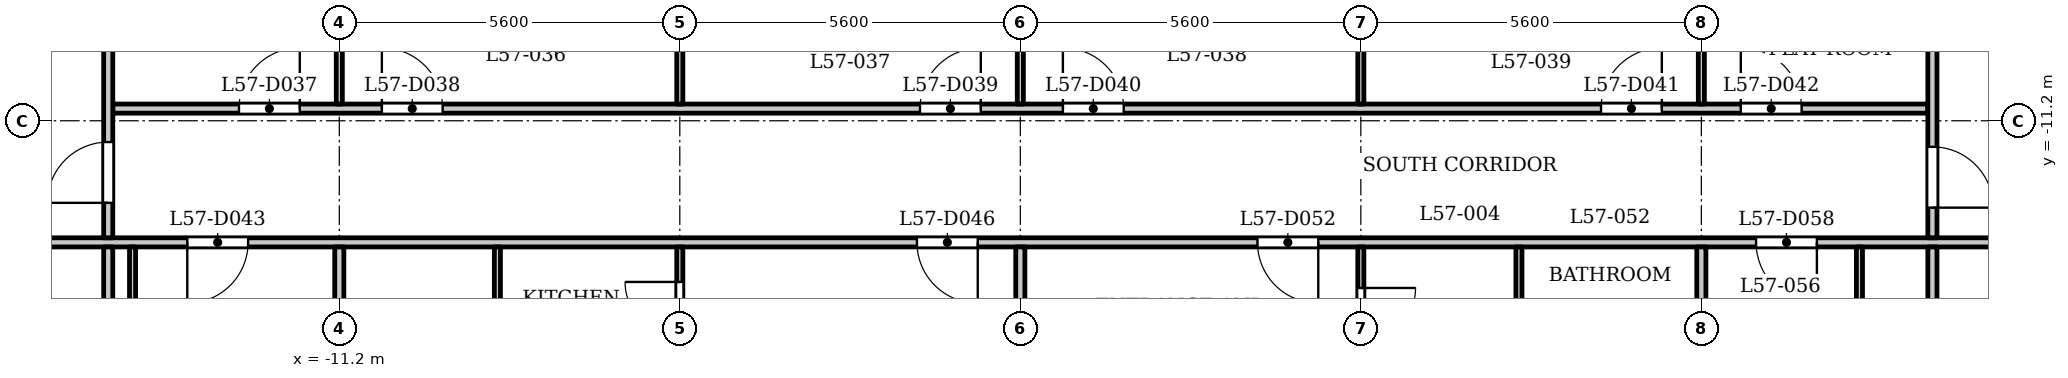
"""IFC4 building model, lengths in metres.
Left out: names, types, materials, properties, quantities, classifications, styles, units other than length and angle.
Written with IfcOpenShell. Run it as: python <this file> out.ifc"""

import sys

from ifc_helpers import new_model, si_unit, direction, frame, frame_2d, origin, place, context, subcontext, project, spatial, rectangle, extrude, element, fill, save


model = new_model("IFC4")
c1 = context("Model", 3, precision=1e-05, world=origin(), true_north=direction((0.0, 1.0)))
c2 = subcontext(c1, "Body", "Model", "MODEL_VIEW")
j1 = project(units=[si_unit("LENGTHUNIT", "METRE"), si_unit("PLANEANGLEUNIT", "RADIAN")], contexts=[c1])
p1 = place(None, origin())
s1 = spatial("IfcSite", under=j1, at=p1, CompositionType="ELEMENT")
p2 = place(p1, origin())
s2 = spatial("IfcBuilding", under=s1, at=p2, CompositionType="ELEMENT")
p3 = place(p2, frame((0.0, 0.0, 220.4)))
s3 = spatial("IfcBuildingStorey", under=s2, at=p3, CompositionType="ELEMENT", Elevation=220.4)
p4 = place(p3, frame((-17.4, -13.2, 0.0), z_axis=(0.0, 0.0, 1.0), x_axis=(1.0, 0.0, 0.0)))
e1 = element("IfcWall", 1, at=p4, inside=s3, PredefinedType="PARTITIONING", context=c2, shape_type="SweptSolid", body=[
    extrude(rectangle(XDim=34.8, YDim=0.15, at=frame_2d((17.4, 0.0))), origin(), (0.0, 0.0, 1.0), 3.2),
])
p5 = place(p4, frame((0.15, 0.0, 0.0)))
e2 = element("IfcOpeningElement", 2, at=p5, cuts=e1, PredefinedType="OPENING", context=c2, shape_type="SweptSolid", body=[
    extrude(rectangle(XDim=1.0, YDim=2.1, at=frame_2d((0.5, 1.05))), frame((0.0, 0.085, 0.0), z_axis=(0.0, -1.0, 0.0), x_axis=(1.0, 0.0, 0.0)), (0.0, 0.0, 1.0), 0.17),
])
p6 = place(p4, frame((33.55, 0.0, 0.0)))
e3 = element("IfcOpeningElement", 3, at=p6, cuts=e1, PredefinedType="OPENING", context=c2, shape_type="SweptSolid", body=[
    extrude(rectangle(XDim=1.0, YDim=2.1, at=frame_2d((0.5, 1.05))), frame((0.0, 0.085, 0.0), z_axis=(0.0, -1.0, 0.0), x_axis=(1.0, 0.0, 0.0)), (0.0, 0.0, 1.0), 0.17),
])
p7 = place(p4, frame((3.7, 0.0, 0.0)))
e4 = element("IfcOpeningElement", 4, at=p7, cuts=e1, PredefinedType="OPENING", context=c2, shape_type="SweptSolid", body=[
    extrude(rectangle(XDim=1.0, YDim=2.1, at=frame_2d((0.5, 1.05))), frame((0.0, 0.085, 0.0), z_axis=(0.0, -1.0, 0.0), x_axis=(1.0, 0.0, 0.0)), (0.0, 0.0, 1.0), 0.17),
])
p8 = place(p4, frame((15.7, 0.0, 0.0)))
e5 = element("IfcOpeningElement", 5, at=p8, cuts=e1, PredefinedType="OPENING", context=c2, shape_type="SweptSolid", body=[
    extrude(rectangle(XDim=1.0, YDim=2.1, at=frame_2d((0.5, 1.05))), frame((0.0, 0.085, 0.0), z_axis=(0.0, -1.0, 0.0), x_axis=(1.0, 0.0, 0.0)), (0.0, 0.0, 1.0), 0.17),
])
p9 = place(p4, frame((21.3, 0.0, 0.0)))
e6 = element("IfcOpeningElement", 6, at=p9, cuts=e1, PredefinedType="OPENING", context=c2, shape_type="SweptSolid", body=[
    extrude(rectangle(XDim=1.0, YDim=2.1, at=frame_2d((0.5, 1.05))), frame((0.0, 0.085, 0.0), z_axis=(0.0, -1.0, 0.0), x_axis=(1.0, 0.0, 0.0)), (0.0, 0.0, 1.0), 0.17),
])
p10 = place(p4, frame((29.5, 0.0, 0.0)))
e7 = element("IfcOpeningElement", 7, at=p10, cuts=e1, PredefinedType="OPENING", context=c2, shape_type="SweptSolid", body=[
    extrude(rectangle(XDim=1.0, YDim=2.1, at=frame_2d((0.5, 1.05))), frame((0.0, 0.085, 0.0), z_axis=(0.0, -1.0, 0.0), x_axis=(1.0, 0.0, 0.0)), (0.0, 0.0, 1.0), 0.17),
])
p11 = place(p3, frame((-14.925, -11.0, 0.0), z_axis=(0.0, 0.0, 1.0), x_axis=(1.0, 0.0, 0.0)))
e8 = element("IfcWall", 8, at=p11, inside=s3, PredefinedType="PARTITIONING", context=c2, shape_type="SweptSolid", body=[
    extrude(rectangle(XDim=29.85, YDim=0.15, at=frame_2d((14.925, 0.0))), origin(), (0.0, 0.0, 1.0), 3.2),
])
p12 = place(p11, frame((2.075, 0.0, 0.0)))
e9 = element("IfcOpeningElement", 9, at=p12, cuts=e8, PredefinedType="OPENING", context=c2, shape_type="SweptSolid", body=[
    extrude(rectangle(XDim=1.0, YDim=2.1, at=frame_2d((0.5, 1.05))), frame((0.0, 0.085, 0.0), z_axis=(0.0, -1.0, 0.0), x_axis=(1.0, 0.0, 0.0)), (0.0, 0.0, 1.0), 0.17),
])
p13 = place(p11, frame((4.425, 0.0, 0.0)))
e10 = element("IfcOpeningElement", 10, at=p13, cuts=e8, PredefinedType="OPENING", context=c2, shape_type="SweptSolid", body=[
    extrude(rectangle(XDim=1.0, YDim=2.1, at=frame_2d((0.5, 1.05))), frame((0.0, 0.085, 0.0), z_axis=(0.0, -1.0, 0.0), x_axis=(1.0, 0.0, 0.0)), (0.0, 0.0, 1.0), 0.17),
])
p14 = place(p11, frame((13.275, 0.0, 0.0)))
e11 = element("IfcOpeningElement", 11, at=p14, cuts=e8, PredefinedType="OPENING", context=c2, shape_type="SweptSolid", body=[
    extrude(rectangle(XDim=1.0, YDim=2.1, at=frame_2d((0.5, 1.05))), frame((0.0, 0.085, 0.0), z_axis=(0.0, -1.0, 0.0), x_axis=(1.0, 0.0, 0.0)), (0.0, 0.0, 1.0), 0.17),
])
p15 = place(p11, frame((15.625, 0.0, 0.0)))
e12 = element("IfcOpeningElement", 12, at=p15, cuts=e8, PredefinedType="OPENING", context=c2, shape_type="SweptSolid", body=[
    extrude(rectangle(XDim=1.0, YDim=2.1, at=frame_2d((0.5, 1.05))), frame((0.0, 0.085, 0.0), z_axis=(0.0, -1.0, 0.0), x_axis=(1.0, 0.0, 0.0)), (0.0, 0.0, 1.0), 0.17),
])
p16 = place(p11, frame((24.475, 0.0, 0.0)))
e13 = element("IfcOpeningElement", 13, at=p16, cuts=e8, PredefinedType="OPENING", context=c2, shape_type="SweptSolid", body=[
    extrude(rectangle(XDim=1.0, YDim=2.1, at=frame_2d((0.5, 1.05))), frame((0.0, 0.085, 0.0), z_axis=(0.0, -1.0, 0.0), x_axis=(1.0, 0.0, 0.0)), (0.0, 0.0, 1.0), 0.17),
])
p17 = place(p11, frame((26.774, 0.0, 0.0)))
e14 = element("IfcOpeningElement", 14, at=p17, cuts=e8, PredefinedType="OPENING", context=c2, shape_type="SweptSolid", body=[
    extrude(rectangle(XDim=1.0, YDim=2.1, at=frame_2d((0.5, 1.05))), frame((0.0, 0.085, 0.0), z_axis=(0.0, -1.0, 0.0), x_axis=(1.0, 0.0, 0.0)), (0.0, 0.0, 1.0), 0.17),
])
p18 = place(p3, frame((-15.0, -15.325, 0.0), z_axis=(0.0, 0.0, 1.0), x_axis=(0.0, 1.0, 0.0)))
e15 = element("IfcWall", 15, at=p18, inside=s3, PredefinedType="PARTITIONING", context=c2, shape_type="SweptSolid", body=[
    extrude(rectangle(XDim=2.05, YDim=0.15, at=frame_2d((1.025, 0.0))), origin(), (0.0, 0.0, 1.0), 3.2),
])
p19 = place(p3, frame((-15.0, -13.125, 0.0), z_axis=(0.0, 0.0, 1.0), x_axis=(0.0, 1.0, 0.0)))
e16 = element("IfcWall", 16, at=p19, inside=s3, PredefinedType="PARTITIONING", context=c2, shape_type="SweptSolid", body=[
    extrude(rectangle(XDim=6.356, YDim=0.15, at=frame_2d((3.178, 0.0))), origin(), (0.0, 0.0, 1.0), 3.2),
])
p20 = place(p19, frame((0.575, 0.0, 0.0)))
e17 = element("IfcOpeningElement", 17, at=p20, cuts=e16, PredefinedType="OPENING", context=c2, shape_type="SweptSolid", body=[
    extrude(rectangle(XDim=1.0, YDim=2.1, at=frame_2d((0.5, 1.05))), frame((0.0, 0.085, 0.0), z_axis=(0.0, -1.0, 0.0), x_axis=(1.0, 0.0, 0.0)), (0.0, 0.0, 1.0), 0.17),
])
p21 = place(p3, frame((-14.6, -16.45, 0.0), z_axis=(0.0, 0.0, 1.0), x_axis=(0.0, 1.0, 0.0)))
e18 = element("IfcWall", 18, at=p21, inside=s3, PredefinedType="PARTITIONING", context=c2, shape_type="SweptSolid", body=[
    extrude(rectangle(XDim=3.175, YDim=0.1, at=frame_2d((1.587, 0.0))), origin(), (0.0, 0.0, 1.0), 3.2),
])
p22 = place(p3, frame((-11.2, -10.925, 0.0), z_axis=(0.0, 0.0, 1.0), x_axis=(0.0, 1.0, 0.0)))
e19 = element("IfcWall", 19, at=p22, inside=s3, PredefinedType="PARTITIONING", context=c2, shape_type="SweptSolid", body=[
    extrude(rectangle(XDim=3.605, YDim=0.1, at=frame_2d((1.802, 0.0))), origin(), (0.0, 0.0, 1.0), 3.2),
])
p23 = place(p3, frame((-11.2, -16.45, 0.0), z_axis=(0.0, 0.0, 1.0), x_axis=(0.0, 1.0, 0.0)))
e20 = element("IfcWall", 20, at=p23, inside=s3, PredefinedType="PARTITIONING", context=c2, shape_type="SweptSolid", body=[
    extrude(rectangle(XDim=3.175, YDim=0.15, at=frame_2d((1.587, 0.0))), origin(), (0.0, 0.0, 1.0), 3.2),
])
p24 = place(p3, frame((-8.6, -16.45, 0.0), z_axis=(0.0, 0.0, 1.0), x_axis=(0.0, 1.0, 0.0)))
e21 = element("IfcWall", 21, at=p24, inside=s3, PredefinedType="PARTITIONING", context=c2, shape_type="SweptSolid", body=[
    extrude(rectangle(XDim=3.175, YDim=0.1, at=frame_2d((1.587, 0.0))), origin(), (0.0, 0.0, 1.0), 3.2),
])
p25 = place(p3, frame((-5.6, -16.45, 0.0), z_axis=(0.0, 0.0, 1.0), x_axis=(0.0, 1.0, 0.0)))
e22 = element("IfcWall", 22, at=p25, inside=s3, PredefinedType="PARTITIONING", context=c2, shape_type="SweptSolid", body=[
    extrude(rectangle(XDim=3.175, YDim=0.1, at=frame_2d((1.587, 0.0))), origin(), (0.0, 0.0, 1.0), 3.2),
])
p26 = place(p25, frame((1.699, 0.0, 0.0)))
e23 = element("IfcOpeningElement", 23, at=p26, cuts=e22, PredefinedType="OPENING", context=c2, shape_type="SweptSolid", body=[
    extrude(rectangle(XDim=0.9, YDim=2.1, at=frame_2d((0.45, 1.05))), frame((0.0, 0.06, 0.0), z_axis=(0.0, -1.0, 0.0), x_axis=(1.0, 0.0, 0.0)), (0.0, 0.0, 1.0), 0.12),
])
for number, where, z_axis, x_axis in (
    (24, (-5.6, -10.925, 0.0), (0.0, 0.0, 1.0), (0.0, 1.0, 0.0)),
    (25, (0.0, -10.925, 0.0), (0.0, 0.0, 1.0), (0.0, 1.0, 0.0)),
):
    element("IfcWall", number, at=place(p3, frame(where, z_axis=z_axis, x_axis=x_axis)), inside=s3, PredefinedType="PARTITIONING", context=c2, shape_type="SweptSolid", body=[
        extrude(rectangle(XDim=3.605, YDim=0.1, at=frame_2d((1.802, 0.0))), origin(), (0.0, 0.0, 1.0), 3.2),
    ])
p27 = place(p3, frame((0.0, -16.45, 0.0), z_axis=(0.0, 0.0, 1.0), x_axis=(0.0, 1.0, 0.0)))
e26 = element("IfcWall", 26, at=p27, inside=s3, PredefinedType="PARTITIONING", context=c2, shape_type="SweptSolid", body=[
    extrude(rectangle(XDim=3.175, YDim=0.15, at=frame_2d((1.587, 0.0))), origin(), (0.0, 0.0, 1.0), 3.2),
])
p28 = place(p3, frame((5.6, -16.45, 0.0), z_axis=(0.0, 0.0, 1.0), x_axis=(0.0, 1.0, 0.0)))
e27 = element("IfcWall", 27, at=p28, inside=s3, PredefinedType="PARTITIONING", context=c2, shape_type="SweptSolid", body=[
    extrude(rectangle(XDim=3.175, YDim=0.1, at=frame_2d((1.587, 0.0))), origin(), (0.0, 0.0, 1.0), 3.2),
])
p29 = place(p28, frame((1.6, 0.0, 0.0)))
e28 = element("IfcOpeningElement", 28, at=p29, cuts=e27, PredefinedType="OPENING", context=c2, shape_type="SweptSolid", body=[
    extrude(rectangle(XDim=0.9, YDim=2.1, at=frame_2d((0.45, 1.05))), frame((0.0, 0.06, 0.0), z_axis=(0.0, -1.0, 0.0), x_axis=(1.0, 0.0, 0.0)), (0.0, 0.0, 1.0), 0.12),
])
p30 = place(p3, frame((5.6, -10.925, 0.0), z_axis=(0.0, 0.0, 1.0), x_axis=(0.0, 1.0, 0.0)))
e29 = element("IfcWall", 29, at=p30, inside=s3, PredefinedType="PARTITIONING", context=c2, shape_type="SweptSolid", body=[
    extrude(rectangle(XDim=3.605, YDim=0.1, at=frame_2d((1.802, 0.0))), origin(), (0.0, 0.0, 1.0), 3.2),
])
p31 = place(p3, frame((8.2, -16.45, 0.0), z_axis=(0.0, 0.0, 1.0), x_axis=(0.0, 1.0, 0.0)))
e30 = element("IfcWall", 30, at=p31, inside=s3, PredefinedType="PARTITIONING", context=c2, shape_type="SweptSolid", body=[
    extrude(rectangle(XDim=3.175, YDim=0.1, at=frame_2d((1.587, 0.0))), origin(), (0.0, 0.0, 1.0), 3.2),
])
p32 = place(p3, frame((11.2, -10.925, 0.0), z_axis=(0.0, 0.0, 1.0), x_axis=(0.0, 1.0, 0.0)))
e31 = element("IfcWall", 31, at=p32, inside=s3, PredefinedType="PARTITIONING", context=c2, shape_type="SweptSolid", body=[
    extrude(rectangle(XDim=3.605, YDim=0.1, at=frame_2d((1.802, 0.0))), origin(), (0.0, 0.0, 1.0), 3.2),
])
p33 = place(p3, frame((11.2, -16.45, 0.0), z_axis=(0.0, 0.0, 1.0), x_axis=(0.0, 1.0, 0.0)))
e32 = element("IfcWall", 32, at=p33, inside=s3, PredefinedType="PARTITIONING", context=c2, shape_type="SweptSolid", body=[
    extrude(rectangle(XDim=3.175, YDim=0.15, at=frame_2d((1.587, 0.0))), origin(), (0.0, 0.0, 1.0), 3.2),
])
p34 = place(p3, frame((13.8, -16.45, 0.0), z_axis=(0.0, 0.0, 1.0), x_axis=(0.0, 1.0, 0.0)))
e33 = element("IfcWall", 33, at=p34, inside=s3, PredefinedType="PARTITIONING", context=c2, shape_type="SweptSolid", body=[
    extrude(rectangle(XDim=3.175, YDim=0.1, at=frame_2d((1.587, 0.0))), origin(), (0.0, 0.0, 1.0), 3.2),
])
p35 = place(p3, frame((15.0, -15.325, 0.0), z_axis=(0.0, 0.0, 1.0), x_axis=(0.0, 1.0, 0.0)))
e34 = element("IfcWall", 34, at=p35, inside=s3, PredefinedType="PARTITIONING", context=c2, shape_type="SweptSolid", body=[
    extrude(rectangle(XDim=2.05, YDim=0.15, at=frame_2d((1.025, 0.0))), origin(), (0.0, 0.0, 1.0), 3.2),
])
p36 = place(p3, frame((15.0, -13.125, 0.0), z_axis=(0.0, 0.0, 1.0), x_axis=(0.0, 1.0, 0.0)))
e35 = element("IfcWall", 35, at=p36, inside=s3, PredefinedType="PARTITIONING", context=c2, shape_type="SweptSolid", body=[
    extrude(rectangle(XDim=6.356, YDim=0.15, at=frame_2d((3.178, 0.0))), origin(), (0.0, 0.0, 1.0), 3.2),
])
p37 = place(p36, frame((0.496, 0.0, 0.0)))
e36 = element("IfcOpeningElement", 36, at=p37, cuts=e35, PredefinedType="OPENING", context=c2, shape_type="SweptSolid", body=[
    extrude(rectangle(XDim=1.0, YDim=2.1, at=frame_2d((0.5, 1.05))), frame((0.0, 0.085, 0.0), z_axis=(0.0, -1.0, 0.0), x_axis=(1.0, 0.0, 0.0)), (0.0, 0.0, 1.0), 0.17),
])
p38 = place(p20, origin())
e37 = element("IfcDoor", 37, at=p38, inside=s3, OperationType="SINGLE_SWING_RIGHT", PredefinedType="DOOR", context=c2, shape_type="SweptSolid", body=[
    extrude(rectangle(XDim=1.0, YDim=2.1, at=frame_2d((0.5, 1.05))), frame((0.0, 0.025, 0.0), z_axis=(0.0, -1.0, 0.0), x_axis=(1.0, 0.0, 0.0)), (0.0, 0.0, 1.0), 0.05),
])
fill(e17, e37)
p39 = place(p37, origin())
e38 = element("IfcDoor", 38, at=p39, inside=s3, OperationType="SINGLE_SWING_LEFT", PredefinedType="DOOR", context=c2, shape_type="SweptSolid", body=[
    extrude(rectangle(XDim=1.0, YDim=2.1, at=frame_2d((0.5, 1.05))), frame((0.0, 0.025, 0.0), z_axis=(0.0, -1.0, 0.0), x_axis=(1.0, 0.0, 0.0)), (0.0, 0.0, 1.0), 0.05),
])
fill(e36, e38)
p40 = place(p12, origin())
e39 = element("IfcDoor", 39, at=p40, inside=s3, OperationType="SINGLE_SWING_LEFT", PredefinedType="DOOR", context=c2, shape_type="SweptSolid", body=[
    extrude(rectangle(XDim=1.0, YDim=2.1, at=frame_2d((0.5, 1.05))), frame((0.0, 0.025, 0.0), z_axis=(0.0, -1.0, 0.0), x_axis=(1.0, 0.0, 0.0)), (0.0, 0.0, 1.0), 0.05),
])
fill(e9, e39)
p41 = place(p13, origin())
e40 = element("IfcDoor", 40, at=p41, inside=s3, OperationType="SINGLE_SWING_RIGHT", PredefinedType="DOOR", context=c2, shape_type="SweptSolid", body=[
    extrude(rectangle(XDim=1.0, YDim=2.1, at=frame_2d((0.5, 1.05))), frame((0.0, 0.025, 0.0), z_axis=(0.0, -1.0, 0.0), x_axis=(1.0, 0.0, 0.0)), (0.0, 0.0, 1.0), 0.05),
])
fill(e10, e40)
p42 = place(p14, origin())
e41 = element("IfcDoor", 41, at=p42, inside=s3, OperationType="SINGLE_SWING_LEFT", PredefinedType="DOOR", context=c2, shape_type="SweptSolid", body=[
    extrude(rectangle(XDim=1.0, YDim=2.1, at=frame_2d((0.5, 1.05))), frame((0.0, 0.025, 0.0), z_axis=(0.0, -1.0, 0.0), x_axis=(1.0, 0.0, 0.0)), (0.0, 0.0, 1.0), 0.05),
])
fill(e11, e41)
p43 = place(p15, origin())
e42 = element("IfcDoor", 42, at=p43, inside=s3, OperationType="SINGLE_SWING_RIGHT", PredefinedType="DOOR", context=c2, shape_type="SweptSolid", body=[
    extrude(rectangle(XDim=1.0, YDim=2.1, at=frame_2d((0.5, 1.05))), frame((0.0, 0.025, 0.0), z_axis=(0.0, -1.0, 0.0), x_axis=(1.0, 0.0, 0.0)), (0.0, 0.0, 1.0), 0.05),
])
fill(e12, e42)
p44 = place(p16, origin())
e43 = element("IfcDoor", 43, at=p44, inside=s3, OperationType="SINGLE_SWING_LEFT", PredefinedType="DOOR", context=c2, shape_type="SweptSolid", body=[
    extrude(rectangle(XDim=1.0, YDim=2.1, at=frame_2d((0.5, 1.05))), frame((0.0, 0.025, 0.0), z_axis=(0.0, -1.0, 0.0), x_axis=(1.0, 0.0, 0.0)), (0.0, 0.0, 1.0), 0.05),
])
fill(e13, e43)
p45 = place(p17, origin())
e44 = element("IfcDoor", 44, at=p45, inside=s3, OperationType="SINGLE_SWING_RIGHT", PredefinedType="DOOR", context=c2, shape_type="SweptSolid", body=[
    extrude(rectangle(XDim=1.0, YDim=2.1, at=frame_2d((0.5, 1.05))), frame((0.0, 0.025, 0.0), z_axis=(0.0, -1.0, 0.0), x_axis=(1.0, 0.0, 0.0)), (0.0, 0.0, 1.0), 0.05),
])
fill(e14, e44)
p46 = place(p7, origin())
e45 = element("IfcDoor", 45, at=p46, inside=s3, OperationType="SINGLE_SWING_LEFT", PredefinedType="DOOR", context=c2, shape_type="SweptSolid", body=[
    extrude(rectangle(XDim=1.0, YDim=2.1, at=frame_2d((0.5, 1.05))), frame((0.0, 0.025, 0.0), z_axis=(0.0, -1.0, 0.0), x_axis=(1.0, 0.0, 0.0)), (0.0, 0.0, 1.0), 0.05),
])
fill(e4, e45)
p47 = place(p8, origin())
e46 = element("IfcDoor", 46, at=p47, inside=s3, OperationType="SINGLE_SWING_RIGHT", PredefinedType="DOOR", context=c2, shape_type="SweptSolid", body=[
    extrude(rectangle(XDim=1.0, YDim=2.1, at=frame_2d((0.5, 1.05))), frame((0.0, 0.025, 0.0), z_axis=(0.0, -1.0, 0.0), x_axis=(1.0, 0.0, 0.0)), (0.0, 0.0, 1.0), 0.05),
])
fill(e5, e46)
p48 = place(p26, origin())
e47 = element("IfcDoor", 47, at=p48, inside=s3, OperationType="SINGLE_SWING_LEFT", PredefinedType="DOOR", context=c2, shape_type="SweptSolid", body=[
    extrude(rectangle(XDim=0.9, YDim=2.1, at=frame_2d((0.45, 1.05))), frame((0.0, 0.025, 0.0), z_axis=(0.0, -1.0, 0.0), x_axis=(1.0, 0.0, 0.0)), (0.0, 0.0, 1.0), 0.05),
])
fill(e23, e47)
p49 = place(p9, origin())
e48 = element("IfcDoor", 48, at=p49, inside=s3, OperationType="SINGLE_SWING_RIGHT", PredefinedType="DOOR", context=c2, shape_type="SweptSolid", body=[
    extrude(rectangle(XDim=1.0, YDim=2.1, at=frame_2d((0.5, 1.05))), frame((0.0, 0.025, 0.0), z_axis=(0.0, -1.0, 0.0), x_axis=(1.0, 0.0, 0.0)), (0.0, 0.0, 1.0), 0.05),
])
fill(e6, e48)
p50 = place(p29, origin())
e49 = element("IfcDoor", 49, at=p50, inside=s3, OperationType="SINGLE_SWING_RIGHT", PredefinedType="DOOR", context=c2, shape_type="SweptSolid", body=[
    extrude(rectangle(XDim=0.9, YDim=2.1, at=frame_2d((0.45, 1.05))), frame((0.0, 0.025, 0.0), z_axis=(0.0, -1.0, 0.0), x_axis=(1.0, 0.0, 0.0)), (0.0, 0.0, 1.0), 0.05),
])
fill(e28, e49)
p51 = place(p10, origin())
e50 = element("IfcDoor", 50, at=p51, inside=s3, OperationType="SINGLE_SWING_RIGHT", PredefinedType="DOOR", context=c2, shape_type="SweptSolid", body=[
    extrude(rectangle(XDim=1.0, YDim=2.1, at=frame_2d((0.5, 1.05))), frame((0.0, 0.025, 0.0), z_axis=(0.0, -1.0, 0.0), x_axis=(1.0, 0.0, 0.0)), (0.0, 0.0, 1.0), 0.05),
])
fill(e7, e50)
save(model, sys.argv[1])
